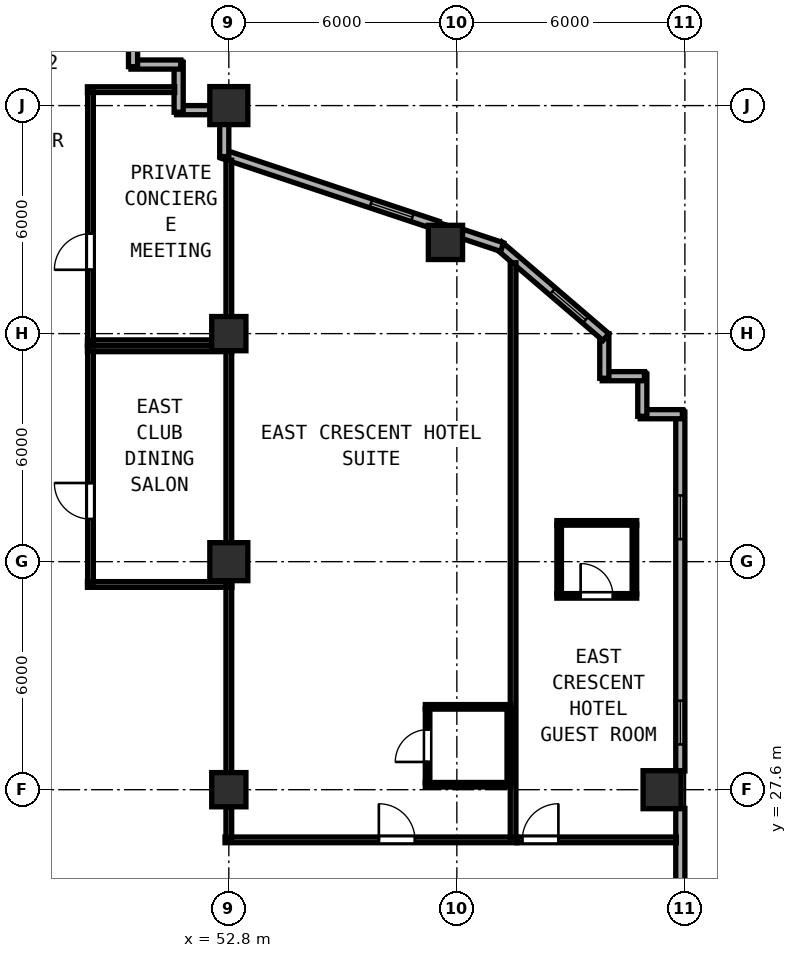
"""IFC4 building model, lengths in metres.
Left out: names, types, materials, properties, quantities, classifications, styles, units other than length and angle.
Written with IfcOpenShell. Run it as: python <this file> out.ifc"""

import sys

from ifc_helpers import new_model, si_unit, direction, frame, frame_2d, origin, origin_2d, place, context, subcontext, project, spatial, rectangle, hollow_rectangle, extrude, element, fill, save


model = new_model("IFC4")
c1 = context("Model", 3, precision=1e-05, world=origin(), true_north=direction((0.0, 1.0)))
c2 = subcontext(c1, "Body", "Model", "MODEL_VIEW")
j1 = project(units=[si_unit("LENGTHUNIT", "METRE"), si_unit("PLANEANGLEUNIT", "RADIAN")], contexts=[c1])
p1 = place(None, origin())
s1 = spatial("IfcSite", under=j1, at=p1, CompositionType="ELEMENT")
p2 = place(p1, origin())
s2 = spatial("IfcBuilding", under=s1, at=p2, CompositionType="ELEMENT")
p3 = place(p2, frame((0.0, 0.0, 106.0)))
s3 = spatial("IfcBuildingStorey", under=s2, at=p3, CompositionType="ELEMENT", Elevation=106.0)
for number, where, z_axis, x_axis in (
    (1, (52.8, 33.6, 0.0), (0.0, 0.0, 1.0), (1.0, 0.0, 0.0)),
    (2, (52.8, 45.6, 0.0), (0.0, 0.0, 1.0), (1.0, 0.0, 0.0)),
    (3, (64.2, 27.6, 0.0), (0.0, 0.0, 1.0), (1.0, 0.0, 0.0)),
):
    element("IfcColumn", number, at=place(p3, frame(where, z_axis=z_axis, x_axis=x_axis)), inside=s3, PredefinedType="COLUMN", context=c2, shape_type="SweptSolid", body=[
        extrude(hollow_rectangle(XDim=1.0, YDim=1.0, WallThickness=0.038, at=origin_2d()), origin(), (0.0, 0.0, 1.0), 3.8),
    ])
for number, where, z_axis, x_axis in (
    (4, (52.8, 27.6, 0.0), (0.0, 0.0, 1.0), (1.0, 0.0, 0.0)),
    (5, (52.8, 39.6, 0.0), (0.0, 0.0, 1.0), (1.0, 0.0, 0.0)),
    (6, (58.5, 42.0, 0.0), (0.0, 0.0, 1.0), (1.0, 0.0, 0.0)),
):
    element("IfcColumn", number, at=place(p3, frame(where, z_axis=z_axis, x_axis=x_axis)), inside=s3, PredefinedType="COLUMN", context=c2, shape_type="SweptSolid", body=[
        extrude(hollow_rectangle(XDim=0.9, YDim=0.9, WallThickness=0.034, at=origin_2d()), origin(), (0.0, 0.0, 1.0), 3.8),
    ])
p4 = place(p3, frame((64.68, 17.292, 0.0), z_axis=(0.0, 0.0, 1.0), x_axis=(0.0, 1.0, 0.0)))
e7 = element("IfcWall", 7, at=p4, inside=s3, PredefinedType="SOLIDWALL", context=c2, shape_type="SweptSolid", body=[
    extrude(rectangle(XDim=9.816, YDim=0.24, at=frame_2d((4.908, 0.0))), origin(), (0.0, 0.0, 1.0), 3.6),
])
p5 = place(p4, frame((0.7, 0.0, 0.85)))
e8 = element("IfcOpeningElement", 8, at=p5, cuts=e7, PredefinedType="OPENING", context=c2, shape_type="SweptSolid", body=[
    extrude(rectangle(XDim=1.15, YDim=1.8, at=frame_2d((0.575, 0.9))), frame((0.0, 0.13, 0.0), z_axis=(0.0, -1.0, 0.0), x_axis=(1.0, 0.0, 0.0)), (0.0, 0.0, 1.0), 0.26),
])
p6 = place(p4, frame((5.593, 0.0, 0.85)))
e9 = element("IfcOpeningElement", 9, at=p6, cuts=e7, PredefinedType="OPENING", context=c2, shape_type="SweptSolid", body=[
    extrude(rectangle(XDim=1.15, YDim=1.8, at=frame_2d((0.575, 0.9))), frame((0.0, 0.13, 0.0), z_axis=(0.0, -1.0, 0.0), x_axis=(1.0, 0.0, 0.0)), (0.0, 0.0, 1.0), 0.26),
])
p7 = place(p3, frame((64.68, 28.092, 0.0), z_axis=(0.0, 0.0, 1.0), x_axis=(0.0, 1.0, 0.0)))
e10 = element("IfcWall", 10, at=p7, inside=s3, PredefinedType="SOLIDWALL", context=c2, shape_type="SweptSolid", body=[
    extrude(rectangle(XDim=9.443, YDim=0.24, at=frame_2d((4.721, 0.0))), origin(), (0.0, 0.0, 1.0), 3.6),
])
p8 = place(p7, frame((0.7, 0.0, 0.85)))
e11 = element("IfcOpeningElement", 11, at=p8, cuts=e10, PredefinedType="OPENING", context=c2, shape_type="SweptSolid", body=[
    extrude(rectangle(XDim=1.15, YDim=1.8, at=frame_2d((0.575, 0.9))), frame((0.0, 0.13, 0.0), z_axis=(0.0, -1.0, 0.0), x_axis=(1.0, 0.0, 0.0)), (0.0, 0.0, 1.0), 0.26),
])
p9 = place(p7, frame((6.1, 0.0, 0.85)))
e12 = element("IfcOpeningElement", 12, at=p9, cuts=e10, PredefinedType="OPENING", context=c2, shape_type="SweptSolid", body=[
    extrude(rectangle(XDim=1.15, YDim=1.8, at=frame_2d((0.575, 0.9))), frame((0.0, 0.13, 0.0), z_axis=(0.0, -1.0, 0.0), x_axis=(1.0, 0.0, 0.0)), (0.0, 0.0, 1.0), 0.26),
])
p10 = place(p3, frame((64.735, 37.48, 0.0), z_axis=(0.0, 0.0, 1.0), x_axis=(-1.0, 0.0, 0.0)))
e13 = element("IfcWall", 13, at=p10, inside=s3, PredefinedType="SOLIDWALL", context=c2, shape_type="SweptSolid", body=[
    extrude(rectangle(XDim=1.11, YDim=0.24, at=frame_2d((0.555, 0.0))), origin(), (0.0, 0.0, 1.0), 3.6),
])
p11 = place(p3, frame((63.68, 37.425, 0.0), z_axis=(0.0, 0.0, 1.0), x_axis=(0.0, 1.0, 0.0)))
e14 = element("IfcWall", 14, at=p11, inside=s3, PredefinedType="SOLIDWALL", context=c2, shape_type="SweptSolid", body=[
    extrude(rectangle(XDim=1.11, YDim=0.24, at=frame_2d((0.555, 0.0))), origin(), (0.0, 0.0, 1.0), 3.6),
])
p12 = place(p3, frame((63.735, 38.48, 0.0), z_axis=(0.0, 0.0, 1.0), x_axis=(-1.0, 0.0, 0.0)))
e15 = element("IfcWall", 15, at=p12, inside=s3, PredefinedType="SOLIDWALL", context=c2, shape_type="SweptSolid", body=[
    extrude(rectangle(XDim=1.11, YDim=0.24, at=frame_2d((0.555, 0.0))), origin(), (0.0, 0.0, 1.0), 3.6),
])
p13 = place(p3, frame((62.68, 38.425, 0.0), z_axis=(0.0, 0.0, 1.0), x_axis=(0.0, 1.0, 0.0)))
e16 = element("IfcWall", 16, at=p13, inside=s3, PredefinedType="SOLIDWALL", context=c2, shape_type="SweptSolid", body=[
    extrude(rectangle(XDim=1.175, YDim=0.24, at=frame_2d((0.587, 0.0))), origin(), (0.0, 0.0, 1.0), 3.6),
])
p14 = place(p3, frame((62.722, 39.509, 0.0), z_axis=(0.0, 0.0, 1.0), x_axis=(-0.759247334792, 0.650802185469, 0.0)))
e17 = element("IfcWall", 17, at=p14, inside=s3, PredefinedType="SOLIDWALL", context=c2, shape_type="SweptSolid", body=[
    extrude(rectangle(XDim=3.719, YDim=0.24, at=frame_2d((1.86, 0.0))), origin(), (0.0, 0.0, 1.0), 3.6),
])
p15 = place(p14, frame((0.7, 0.0, 0.85)))
e18 = element("IfcOpeningElement", 18, at=p15, cuts=e17, PredefinedType="OPENING", context=c2, shape_type="SweptSolid", body=[
    extrude(rectangle(XDim=1.15, YDim=1.8, at=frame_2d((0.575, 0.9))), frame((0.0, 0.13, 0.0), z_axis=(0.0, -1.0, 0.0), x_axis=(1.0, 0.0, 0.0)), (0.0, 0.0, 1.0), 0.26),
])
p16 = place(p3, frame((59.992, 41.876, 0.0), z_axis=(0.0, 0.0, 1.0), x_axis=(-0.948661238983, 0.316293935527, 0.0)))
e19 = element("IfcWall", 19, at=p16, inside=s3, PredefinedType="SOLIDWALL", context=c2, shape_type="SweptSolid", body=[
    extrude(rectangle(XDim=1.107, YDim=0.24, at=frame_2d((0.553, 0.0))), origin(), (0.0, 0.0, 1.0), 3.6),
])
p17 = place(p3, frame((58.295, 42.442, 0.0), z_axis=(0.0, 0.0, 1.0), x_axis=(-0.948687385027, 0.316215504823, 0.0)))
e20 = element("IfcWall", 20, at=p17, inside=s3, PredefinedType="SOLIDWALL", context=c2, shape_type="SweptSolid", body=[
    extrude(rectangle(XDim=5.973, YDim=0.24, at=frame_2d((2.987, 0.0))), origin(), (0.0, 0.0, 1.0), 3.145),
])
p18 = place(p17, frame((0.7, 0.0, 0.85)))
e21 = element("IfcOpeningElement", 21, at=p18, cuts=e20, PredefinedType="OPENING", context=c2, shape_type="SweptSolid", body=[
    extrude(rectangle(XDim=1.15, YDim=1.8, at=frame_2d((0.575, 0.9))), frame((0.0, 0.13, 0.0), z_axis=(0.0, -1.0, 0.0), x_axis=(1.0, 0.0, 0.0)), (0.0, 0.0, 1.0), 0.26),
])
p19 = place(p3, frame((52.68, 44.259, 0.0), z_axis=(0.0, 0.0, 1.0), x_axis=(0.0, 1.0, 0.0)))
e22 = element("IfcWall", 22, at=p19, inside=s3, PredefinedType="SOLIDWALL", context=c2, shape_type="SweptSolid", body=[
    extrude(rectangle(XDim=0.849, YDim=0.24, at=frame_2d((0.425, 0.0))), origin(), (0.0, 0.0, 1.0), 3.145),
])
p20 = place(p3, frame((52.308, 45.48, 0.0), z_axis=(0.0, 0.0, 1.0), x_axis=(-1.0, 0.0, 0.0)))
e23 = element("IfcWall", 23, at=p20, inside=s3, PredefinedType="SOLIDWALL", context=c2, shape_type="SweptSolid", body=[
    extrude(rectangle(XDim=0.883, YDim=0.24, at=frame_2d((0.441, 0.0))), origin(), (0.0, 0.0, 1.0), 3.6),
])
p21 = place(p3, frame((51.48, 45.425, 0.0), z_axis=(0.0, 0.0, 1.0), x_axis=(0.0, 1.0, 0.0)))
e24 = element("IfcWall", 24, at=p21, inside=s3, PredefinedType="SOLIDWALL", context=c2, shape_type="SweptSolid", body=[
    extrude(rectangle(XDim=1.31, YDim=0.24, at=frame_2d((0.655, 0.0))), origin(), (0.0, 0.0, 1.0), 3.6),
])
p22 = place(p3, frame((51.535, 46.68, 0.0), z_axis=(0.0, 0.0, 1.0), x_axis=(-1.0, 0.0, 0.0)))
e25 = element("IfcWall", 25, at=p22, inside=s3, PredefinedType="SOLIDWALL", context=c2, shape_type="SweptSolid", body=[
    extrude(rectangle(XDim=1.31, YDim=0.24, at=frame_2d((0.655, 0.0))), origin(), (0.0, 0.0, 1.0), 3.6),
])
p23 = place(p3, frame((50.28, 46.625, 0.0), z_axis=(0.0, 0.0, 1.0), x_axis=(0.0, 1.0, 0.0)))
e26 = element("IfcWall", 26, at=p23, inside=s3, PredefinedType="SOLIDWALL", context=c2, shape_type="SweptSolid", body=[
    extrude(rectangle(XDim=1.54, YDim=0.24, at=frame_2d((0.77, 0.0))), origin(), (0.0, 0.0, 1.0), 3.6),
])
for number, where, z_axis, x_axis in (
    (27, (49.08, 39.2, 0.0), (0.0, 0.0, 1.0), (1.0, 0.0, 0.0)),
    (28, (49.08, 33.0, 0.0), (0.0, 0.0, 1.0), (1.0, 0.0, 0.0)),
):
    element("IfcWall", number, at=place(p3, frame(where, z_axis=z_axis, x_axis=x_axis)), inside=s3, PredefinedType="PARTITIONING", context=c2, shape_type="SweptSolid", body=[
        extrude(rectangle(XDim=3.8, YDim=0.15, at=frame_2d((1.9, 0.0))), origin(), (0.0, 0.0, 1.0), 3.6),
    ])
p24 = place(p3, frame((49.16, 33.06, 0.0), z_axis=(0.0, 0.0, 1.0), x_axis=(0.0, 1.0, 0.0)))
e29 = element("IfcWall", 29, at=p24, inside=s3, PredefinedType="PARTITIONING", context=c2, shape_type="SweptSolid", body=[
    extrude(rectangle(XDim=6.08, YDim=0.15, at=frame_2d((3.04, 0.0))), origin(), (0.0, 0.0, 1.0), 3.6),
])
p25 = place(p24, frame((1.66, 0.0, 0.0)))
e30 = element("IfcOpeningElement", 30, at=p25, cuts=e29, PredefinedType="OPENING", context=c2, shape_type="SweptSolid", body=[
    extrude(rectangle(XDim=0.95, YDim=2.12, at=frame_2d((0.475, 1.06))), frame((0.0, 0.085, 0.0), z_axis=(0.0, -1.0, 0.0), x_axis=(1.0, 0.0, 0.0)), (0.0, 0.0, 1.0), 0.17),
])
p26 = place(p3, frame((52.8, 33.06, 0.0), z_axis=(0.0, 0.0, 1.0), x_axis=(0.0, 1.0, 0.0)))
e31 = element("IfcWall", 31, at=p26, inside=s3, PredefinedType="PARTITIONING", context=c2, shape_type="SweptSolid", body=[
    extrude(rectangle(XDim=6.08, YDim=0.15, at=frame_2d((3.04, 0.0))), origin(), (0.0, 0.0, 1.0), 3.145),
])
p27 = place(p3, frame((49.08, 46.02, 0.0), z_axis=(0.0, 0.0, 1.0), x_axis=(1.0, 0.0, 0.0)))
e32 = element("IfcWall", 32, at=p27, inside=s3, PredefinedType="PARTITIONING", context=c2, shape_type="SweptSolid", body=[
    extrude(rectangle(XDim=2.295, YDim=0.15, at=frame_2d((1.147, 0.0))), origin(), (0.0, 0.0, 1.0), 3.6),
])
p28 = place(p3, frame((49.08, 39.36, 0.0), z_axis=(0.0, 0.0, 1.0), x_axis=(1.0, 0.0, 0.0)))
e33 = element("IfcWall", 33, at=p28, inside=s3, PredefinedType="PARTITIONING", context=c2, shape_type="SweptSolid", body=[
    extrude(rectangle(XDim=3.8, YDim=0.15, at=frame_2d((1.9, 0.0))), origin(), (0.0, 0.0, 1.0), 3.6),
])
p29 = place(p3, frame((49.16, 39.42, 0.0), z_axis=(0.0, 0.0, 1.0), x_axis=(0.0, 1.0, 0.0)))
e34 = element("IfcWall", 34, at=p29, inside=s3, PredefinedType="PARTITIONING", context=c2, shape_type="SweptSolid", body=[
    extrude(rectangle(XDim=6.54, YDim=0.15, at=frame_2d((3.27, 0.0))), origin(), (0.0, 0.0, 1.0), 3.6),
])
p30 = place(p29, frame((1.86, 0.0, 0.0)))
e35 = element("IfcOpeningElement", 35, at=p30, cuts=e34, PredefinedType="OPENING", context=c2, shape_type="SweptSolid", body=[
    extrude(rectangle(XDim=0.95, YDim=2.12, at=frame_2d((0.475, 1.06))), frame((0.0, 0.085, 0.0), z_axis=(0.0, -1.0, 0.0), x_axis=(1.0, 0.0, 0.0)), (0.0, 0.0, 1.0), 0.17),
])
p31 = place(p3, frame((52.8, 39.42, 0.0), z_axis=(0.0, 0.0, 1.0), x_axis=(0.0, 1.0, 0.0)))
e36 = element("IfcWall", 36, at=p31, inside=s3, PredefinedType="PARTITIONING", context=c2, shape_type="SweptSolid", body=[
    extrude(rectangle(XDim=4.743, YDim=0.15, at=frame_2d((2.372, 0.0))), origin(), (0.0, 0.0, 1.0), 3.145),
])
p32 = place(p3, frame((52.7, 26.28, 0.0), z_axis=(0.0, 0.0, 1.0), x_axis=(1.0, 0.0, 0.0)))
e37 = element("IfcWall", 37, at=p32, inside=s3, PredefinedType="PARTITIONING", context=c2, shape_type="SweptSolid", body=[
    extrude(rectangle(XDim=7.68, YDim=0.15, at=frame_2d((3.84, 0.0))), origin(), (0.0, 0.0, 1.0), 3.6),
])
p33 = place(p32, frame((4.048, 0.0, 0.0)))
e38 = element("IfcOpeningElement", 38, at=p33, cuts=e37, PredefinedType="OPENING", context=c2, shape_type="SweptSolid", body=[
    extrude(rectangle(XDim=0.95, YDim=2.18, at=frame_2d((0.475, 1.09))), frame((0.0, 0.085, 0.0), z_axis=(0.0, -1.0, 0.0), x_axis=(1.0, 0.0, 0.0)), (0.0, 0.0, 1.0), 0.17),
])
p34 = place(p3, frame((52.8, 26.34, 0.0), z_axis=(0.0, 0.0, 1.0), x_axis=(0.0, 1.0, 0.0)))
e39 = element("IfcWall", 39, at=p34, inside=s3, PredefinedType="PARTITIONING", context=c2, shape_type="SweptSolid", body=[
    extrude(rectangle(XDim=6.6, YDim=0.15, at=frame_2d((3.3, 0.0))), origin(), (0.0, 0.0, 1.0), 3.145),
])
p35 = place(p3, frame((60.28, 26.34, 0.0), z_axis=(0.0, 0.0, 1.0), x_axis=(0.0, 1.0, 0.0)))
e40 = element("IfcWall", 40, at=p35, inside=s3, PredefinedType="PARTITIONING", context=c2, shape_type="SweptSolid", body=[
    extrude(rectangle(XDim=15.124, YDim=0.15, at=frame_2d((7.562, 0.0))), origin(), (0.0, 0.0, 1.0), 3.6),
])
p36 = place(p3, frame((57.97, 29.78, 0.0), z_axis=(0.0, 0.0, 1.0), x_axis=(1.0, 0.0, 0.0)))
e41 = element("IfcWall", 41, at=p36, inside=s3, PredefinedType="PARTITIONING", context=c2, shape_type="SweptSolid", body=[
    extrude(rectangle(XDim=2.25, YDim=0.12, at=frame_2d((1.125, 0.0))), origin(), (0.0, 0.0, 1.0), 3.6),
])
p37 = place(p3, frame((57.97, 27.73, 0.0), z_axis=(0.0, 0.0, 1.0), x_axis=(1.0, 0.0, 0.0)))
e42 = element("IfcWall", 42, at=p37, inside=s3, PredefinedType="PARTITIONING", context=c2, shape_type="SweptSolid", body=[
    extrude(rectangle(XDim=2.25, YDim=0.12, at=frame_2d((1.125, 0.0))), origin(), (0.0, 0.0, 1.0), 3.145),
])
p38 = place(p3, frame((58.03, 27.775, 0.0), z_axis=(0.0, 0.0, 1.0), x_axis=(0.0, 1.0, 0.0)))
e43 = element("IfcWall", 43, at=p38, inside=s3, PredefinedType="PARTITIONING", context=c2, shape_type="SweptSolid", body=[
    extrude(rectangle(XDim=1.96, YDim=0.12, at=frame_2d((0.98, 0.0))), origin(), (0.0, 0.0, 1.0), 3.6),
])
p39 = place(p38, frame((1.405, 0.0, 0.0), z_axis=(0.0, 0.0, 1.0), x_axis=(-1.0, 0.0, 0.0)))
e44 = element("IfcOpeningElement", 44, at=p39, cuts=e43, PredefinedType="OPENING", context=c2, shape_type="SweptSolid", body=[
    extrude(rectangle(XDim=0.85, YDim=2.1, at=frame_2d((0.425, 1.05))), frame((0.0, 0.07, 0.0), z_axis=(0.0, -1.0, 0.0), x_axis=(1.0, 0.0, 0.0)), (0.0, 0.0, 1.0), 0.14),
])
p40 = place(p3, frame((60.18, 27.775, 0.0), z_axis=(0.0, 0.0, 1.0), x_axis=(0.0, 1.0, 0.0)))
e45 = element("IfcWall", 45, at=p40, inside=s3, PredefinedType="PARTITIONING", context=c2, shape_type="SweptSolid", body=[
    extrude(rectangle(XDim=1.96, YDim=0.12, at=frame_2d((0.98, 0.0))), origin(), (0.0, 0.0, 1.0), 3.6),
])
p41 = place(p3, frame((60.382, 26.28, 0.0), z_axis=(0.0, 0.0, 1.0), x_axis=(1.0, 0.0, 0.0)))
e46 = element("IfcWall", 46, at=p41, inside=s3, PredefinedType="PARTITIONING", context=c2, shape_type="SweptSolid", body=[
    extrude(rectangle(XDim=4.193, YDim=0.15, at=frame_2d((2.096, 0.0))), origin(), (0.0, 0.0, 1.0), 3.6),
])
p42 = place(p41, frame((0.14, 0.0, 0.0)))
e47 = element("IfcOpeningElement", 47, at=p42, cuts=e46, PredefinedType="OPENING", context=c2, shape_type="SweptSolid", body=[
    extrude(rectangle(XDim=0.95, YDim=2.15, at=frame_2d((0.475, 1.075))), frame((0.0, 0.085, 0.0), z_axis=(0.0, -1.0, 0.0), x_axis=(1.0, 0.0, 0.0)), (0.0, 0.0, 1.0), 0.17),
])
p43 = place(p3, frame((61.432, 34.62, 0.0), z_axis=(0.0, 0.0, 1.0), x_axis=(1.0, 0.0, 0.0)))
e48 = element("IfcWall", 48, at=p43, inside=s3, PredefinedType="PARTITIONING", context=c2, shape_type="SweptSolid", body=[
    extrude(rectangle(XDim=2.1, YDim=0.12, at=frame_2d((1.05, 0.0))), origin(), (0.0, 0.0, 1.0), 3.6),
])
p44 = place(p3, frame((61.432, 32.7, 0.0), z_axis=(0.0, 0.0, 1.0), x_axis=(1.0, 0.0, 0.0)))
e49 = element("IfcWall", 49, at=p44, inside=s3, PredefinedType="PARTITIONING", context=c2, shape_type="SweptSolid", body=[
    extrude(rectangle(XDim=2.1, YDim=0.12, at=frame_2d((1.05, 0.0))), origin(), (0.0, 0.0, 1.0), 3.6),
])
p45 = place(p44, frame((0.625, 0.0, 0.0)))
e50 = element("IfcOpeningElement", 50, at=p45, cuts=e49, PredefinedType="OPENING", context=c2, shape_type="SweptSolid", body=[
    extrude(rectangle(XDim=0.85, YDim=2.1, at=frame_2d((0.425, 1.05))), frame((0.0, 0.07, 0.0), z_axis=(0.0, -1.0, 0.0), x_axis=(1.0, 0.0, 0.0)), (0.0, 0.0, 1.0), 0.14),
])
for number, where, z_axis, x_axis in (
    (51, (61.492, 32.745, 0.0), (0.0, 0.0, 1.0), (0.0, 1.0, 0.0)),
    (52, (63.472, 32.745, 0.0), (0.0, 0.0, 1.0), (0.0, 1.0, 0.0)),
):
    element("IfcWall", number, at=place(p3, frame(where, z_axis=z_axis, x_axis=x_axis)), inside=s3, PredefinedType="PARTITIONING", context=c2, shape_type="SweptSolid", body=[
        extrude(rectangle(XDim=1.83, YDim=0.12, at=frame_2d((0.915, 0.0))), origin(), (0.0, 0.0, 1.0), 3.6),
    ])
p46 = place(p8, origin())
e53 = element("IfcWindow", 53, at=p46, inside=s3, PartitioningType="SINGLE_PANEL", PredefinedType="WINDOW", context=c2, shape_type="SweptSolid", body=[
    extrude(rectangle(XDim=1.15, YDim=1.8, at=frame_2d((0.575, 0.9))), frame((0.0, 0.03, 0.0), z_axis=(0.0, -1.0, 0.0), x_axis=(1.0, 0.0, 0.0)), (0.0, 0.0, 1.0), 0.06),
])
fill(e11, e53)
p47 = place(p9, origin())
e54 = element("IfcWindow", 54, at=p47, inside=s3, PartitioningType="SINGLE_PANEL", PredefinedType="WINDOW", context=c2, shape_type="SweptSolid", body=[
    extrude(rectangle(XDim=1.15, YDim=1.8, at=frame_2d((0.575, 0.9))), frame((0.0, 0.03, 0.0), z_axis=(0.0, -1.0, 0.0), x_axis=(1.0, 0.0, 0.0)), (0.0, 0.0, 1.0), 0.06),
])
fill(e12, e54)
p48 = place(p15, origin())
e55 = element("IfcWindow", 55, at=p48, inside=s3, PartitioningType="SINGLE_PANEL", PredefinedType="WINDOW", context=c2, shape_type="SweptSolid", body=[
    extrude(rectangle(XDim=1.15, YDim=1.8, at=frame_2d((0.575, 0.9))), frame((0.0, 0.03, 0.0), z_axis=(0.0, -1.0, 0.0), x_axis=(1.0, 0.0, 0.0)), (0.0, 0.0, 1.0), 0.06),
])
fill(e18, e55)
p49 = place(p18, origin())
e56 = element("IfcWindow", 56, at=p49, inside=s3, PartitioningType="SINGLE_PANEL", PredefinedType="WINDOW", context=c2, shape_type="SweptSolid", body=[
    extrude(rectangle(XDim=1.15, YDim=1.8, at=frame_2d((0.575, 0.9))), frame((0.0, 0.03, 0.0), z_axis=(0.0, -1.0, 0.0), x_axis=(1.0, 0.0, 0.0)), (0.0, 0.0, 1.0), 0.06),
])
fill(e21, e56)
p50 = place(p25, origin())
e57 = element("IfcDoor", 57, at=p50, inside=s3, OperationType="SINGLE_SWING_RIGHT", PredefinedType="DOOR", context=c2, shape_type="SweptSolid", body=[
    extrude(rectangle(XDim=0.95, YDim=2.12, at=frame_2d((0.475, 1.06))), frame((0.0, 0.025, 0.0), z_axis=(0.0, -1.0, 0.0), x_axis=(1.0, 0.0, 0.0)), (0.0, 0.0, 1.0), 0.05),
])
fill(e30, e57)
p51 = place(p30, origin())
e58 = element("IfcDoor", 58, at=p51, inside=s3, OperationType="SINGLE_SWING_LEFT", PredefinedType="DOOR", context=c2, shape_type="SweptSolid", body=[
    extrude(rectangle(XDim=0.95, YDim=2.12, at=frame_2d((0.475, 1.06))), frame((0.0, 0.025, 0.0), z_axis=(0.0, -1.0, 0.0), x_axis=(1.0, 0.0, 0.0)), (0.0, 0.0, 1.0), 0.05),
])
fill(e35, e58)
p52 = place(p33, origin())
e59 = element("IfcDoor", 59, at=p52, inside=s3, OperationType="SINGLE_SWING_LEFT", PredefinedType="DOOR", context=c2, shape_type="SweptSolid", body=[
    extrude(rectangle(XDim=0.95, YDim=2.18, at=frame_2d((0.475, 1.09))), frame((0.0, 0.025, 0.0), z_axis=(0.0, -1.0, 0.0), x_axis=(1.0, 0.0, 0.0)), (0.0, 0.0, 1.0), 0.05),
])
fill(e38, e59)
p53 = place(p39, origin())
e60 = element("IfcDoor", 60, at=p53, inside=s3, OperationType="SINGLE_SWING_RIGHT", PredefinedType="DOOR", context=c2, shape_type="SweptSolid", body=[
    extrude(rectangle(XDim=0.85, YDim=2.1, at=frame_2d((0.425, 1.05))), frame((0.0, 0.025, 0.0), z_axis=(0.0, -1.0, 0.0), x_axis=(1.0, 0.0, 0.0)), (0.0, 0.0, 1.0), 0.05),
])
fill(e44, e60)
p54 = place(p42, origin())
e61 = element("IfcDoor", 61, at=p54, inside=s3, OperationType="SINGLE_SWING_RIGHT", PredefinedType="DOOR", context=c2, shape_type="SweptSolid", body=[
    extrude(rectangle(XDim=0.95, YDim=2.15, at=frame_2d((0.475, 1.075))), frame((0.0, 0.025, 0.0), z_axis=(0.0, -1.0, 0.0), x_axis=(1.0, 0.0, 0.0)), (0.0, 0.0, 1.0), 0.05),
])
fill(e47, e61)
p55 = place(p45, origin())
e62 = element("IfcDoor", 62, at=p55, inside=s3, OperationType="SINGLE_SWING_LEFT", PredefinedType="DOOR", context=c2, shape_type="SweptSolid", body=[
    extrude(rectangle(XDim=0.85, YDim=2.1, at=frame_2d((0.425, 1.05))), frame((0.0, 0.025, 0.0), z_axis=(0.0, -1.0, 0.0), x_axis=(1.0, 0.0, 0.0)), (0.0, 0.0, 1.0), 0.05),
])
fill(e50, e62)
save(model, sys.argv[1])
